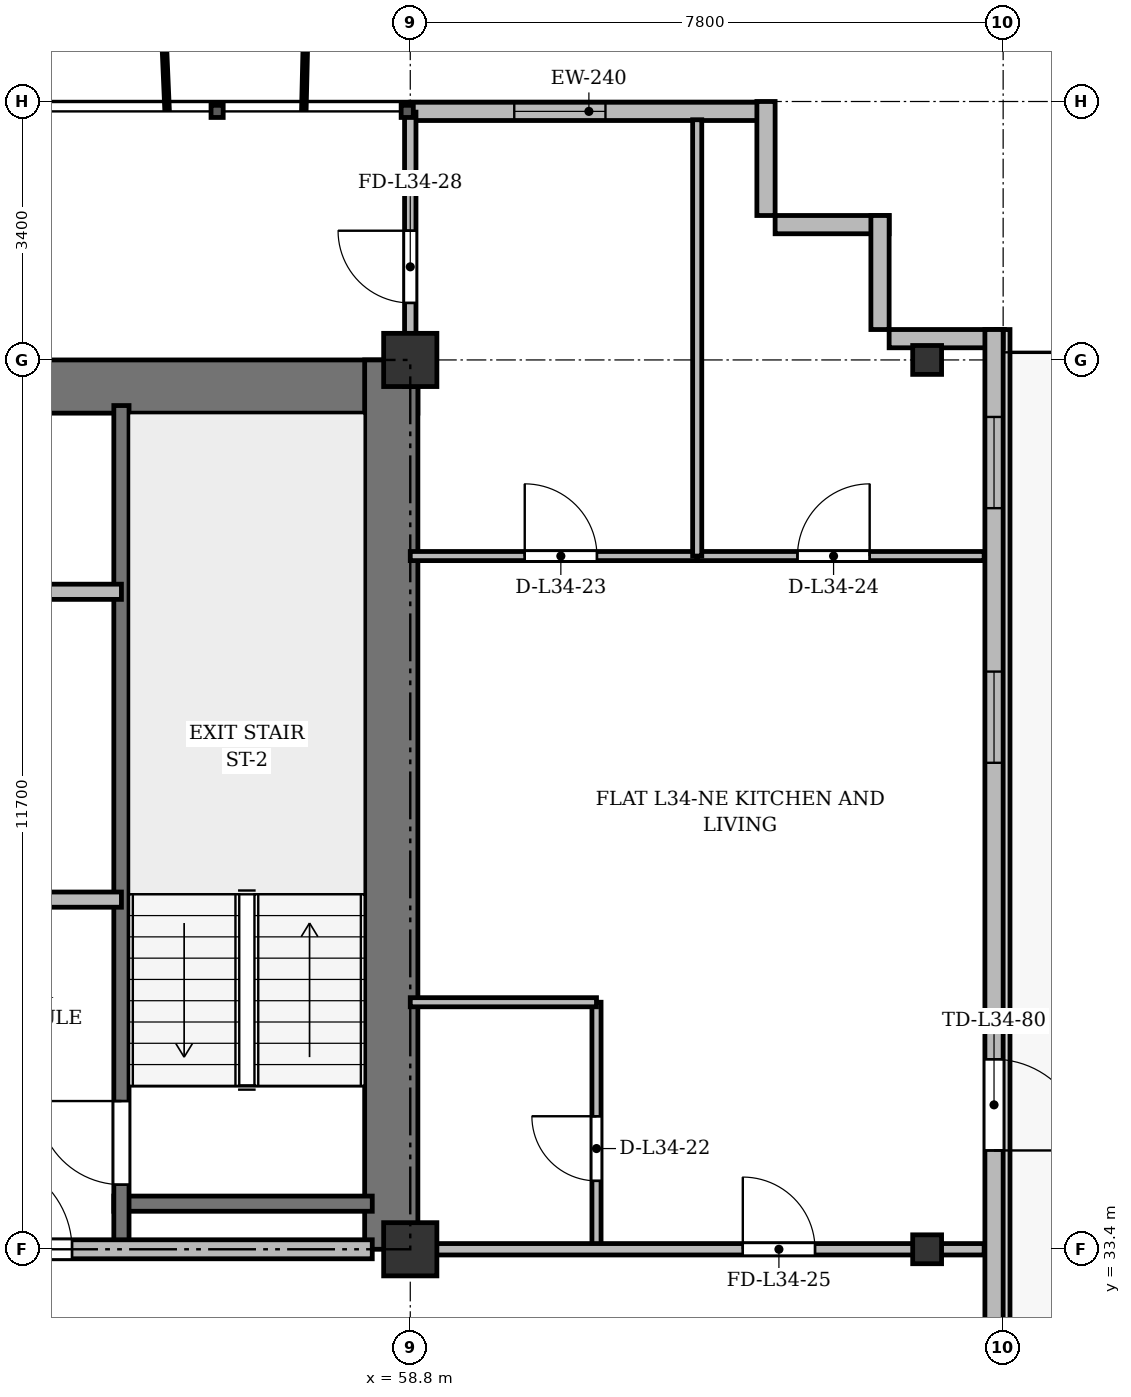
"""IFC4 building model, lengths in metres.
Left out: names, types, materials, properties, quantities, classifications, styles, units other than length and angle.
Written with IfcOpenShell. Run it as: python <this file> out.ifc"""

import sys

from ifc_helpers import new_model, si_unit, direction, frame, frame_2d, origin, origin_2d, place, context, subcontext, project, spatial, rectangle, i_section, extrude, source, transform, mapped, element, fill, save


model = new_model("IFC4")
c1 = context("Model", 3, precision=1e-05, world=origin(), true_north=direction((0.0, 1.0)))
c2 = subcontext(c1, "Body", "Model", "MODEL_VIEW")
j1 = project(units=[si_unit("LENGTHUNIT", "METRE"), si_unit("PLANEANGLEUNIT", "RADIAN")], contexts=[c1])
p1 = place(None, origin())
s1 = spatial("IfcSite", under=j1, at=p1, CompositionType="ELEMENT")
p2 = place(p1, origin())
s2 = spatial("IfcBuilding", under=s1, at=p2, CompositionType="ELEMENT")
p3 = place(p2, frame((0.0, 0.0, 132.1)))
s3 = spatial("IfcBuildingStorey", under=s2, at=p3, CompositionType="ELEMENT", Elevation=132.1)
m1 = source(origin(), c2, "Body", "SweptSolid", [
    extrude(rectangle(XDim=0.7, YDim=0.7, at=origin_2d()), origin(), (0.0, 0.0, 1.0), 3.6),
])
for number, where, z_axis, x_axis in (
    (1, (58.8, 33.4, 0.0), (0.0, 0.0, 1.0), (1.0, 0.0, 0.0)),
    (2, (58.8, 45.1, 0.0), (0.0, 0.0, 1.0), (1.0, 0.0, 0.0)),
):
    element("IfcColumn", number, at=place(p3, frame(where, z_axis=z_axis, x_axis=x_axis)), inside=s3, PredefinedType="COLUMN", context=c2, shape_type="MappedRepresentation", body=[
        mapped(m1, transform((0.0, 0.0, 0.0), x_axis=(1.0, 0.0, 0.0), y_axis=(0.0, 1.0, 0.0), z_axis=(0.0, 0.0, 1.0), scale=1.0)),
    ])
m2 = source(origin(), c2, "Body", "SweptSolid", [
    extrude(i_section(OverallWidth=0.38, OverallDepth=0.38, WebThickness=0.02, FlangeThickness=0.03, at=origin_2d()), origin(), (0.0, 0.0, 1.0), 3.6),
])
for number, where, z_axis, x_axis in (
    (3, (65.6, 33.4, 0.0), (0.0, 0.0, 1.0), (1.0, 0.0, 0.0)),
    (4, (65.6, 45.1, 0.0), (0.0, 0.0, 1.0), (1.0, 0.0, 0.0)),
):
    element("IfcColumn", number, at=place(p3, frame(where, z_axis=z_axis, x_axis=x_axis)), inside=s3, PredefinedType="COLUMN", context=c2, shape_type="MappedRepresentation", body=[
        mapped(m2, transform((0.0, 0.0, 0.0), x_axis=(1.0, 0.0, 0.0), y_axis=(0.0, 1.0, 0.0), z_axis=(0.0, 0.0, 1.0), scale=1.0)),
    ])
p4 = place(p3, frame((58.8, 48.37, 0.0), z_axis=(0.0, 0.0, 1.0), x_axis=(1.0, 0.0, 0.0)))
e5 = element("IfcWall", 5, at=p4, inside=s3, PredefinedType="SOLIDWALL", context=c2, shape_type="SweptSolid", body=[
    extrude(rectangle(XDim=4.7, YDim=0.24, at=frame_2d((2.35, 0.0))), origin(), (0.0, 0.0, 1.0), 3.35),
])
p5 = place(p4, frame((1.368, 0.0, 0.9)))
e6 = element("IfcOpeningElement", 6, at=p5, cuts=e5, PredefinedType="OPENING", context=c2, shape_type="SweptSolid", body=[
    extrude(rectangle(XDim=1.2, YDim=1.65, at=frame_2d((0.6, 0.825))), frame((0.0, 0.13, 0.0), z_axis=(0.0, -1.0, 0.0), x_axis=(1.0, 0.0, 0.0)), (0.0, 0.0, 1.0), 0.26),
])
for number, where, z_axis, x_axis in (
    (7, (63.48, 48.5, 0.0), (0.0, 0.0, 1.0), (0.0, -1.0, 0.0)),
    (8, (63.6, 46.88, 0.0), (0.0, 0.0, 1.0), (1.0, 0.0, 0.0)),
    (9, (64.98, 47.0, 0.0), (0.0, 0.0, 1.0), (0.0, -1.0, 0.0)),
    (10, (65.1, 45.38, 0.0), (0.0, 0.0, 1.0), (1.0, 0.0, 0.0)),
):
    element("IfcWall", number, at=place(p3, frame(where, z_axis=z_axis, x_axis=x_axis)), inside=s3, PredefinedType="SOLIDWALL", context=c2, shape_type="SweptSolid", body=[
        extrude(rectangle(XDim=1.5, YDim=0.24, at=frame_2d((0.75, 0.0))), origin(), (0.0, 0.0, 1.0), 3.35),
    ])
p6 = place(p3, frame((66.48, 45.5, 0.0), z_axis=(0.0, 0.0, 1.0), x_axis=(0.0, -1.0, 0.0)))
e11 = element("IfcWall", 11, at=p6, inside=s3, PredefinedType="SOLIDWALL", context=c2, shape_type="SweptSolid", body=[
    extrude(rectangle(XDim=39.2, YDim=0.24, at=frame_2d((19.6, 0.0))), origin(), (0.0, 0.0, 1.0), 3.35),
])
p7 = place(p6, frame((9.6, 0.0, 0.0)))
e12 = element("IfcOpeningElement", 12, at=p7, cuts=e11, PredefinedType="OPENING", context=c2, shape_type="SweptSolid", body=[
    extrude(rectangle(XDim=1.2, YDim=2.2, at=frame_2d((0.6, 1.1))), frame((0.0, 0.13, 0.0), z_axis=(0.0, -1.0, 0.0), x_axis=(1.0, 0.0, 0.0)), (0.0, 0.0, 1.0), 0.26),
])
p8 = place(p6, frame((36.55, 0.0, 0.92)))
e13 = element("IfcOpeningElement", 13, at=p8, cuts=e11, PredefinedType="OPENING", context=c2, shape_type="SweptSolid", body=[
    extrude(rectangle(XDim=1.2, YDim=1.65, at=frame_2d((0.6, 0.825))), frame((0.0, 0.13, 0.0), z_axis=(0.0, -1.0, 0.0), x_axis=(1.0, 0.0, 0.0)), (0.0, 0.0, 1.0), 0.26),
])
p9 = place(p6, frame((32.8, 0.0, 0.92)))
e14 = element("IfcOpeningElement", 14, at=p9, cuts=e11, PredefinedType="OPENING", context=c2, shape_type="SweptSolid", body=[
    extrude(rectangle(XDim=2.6, YDim=1.9, at=frame_2d((1.3, 0.95))), frame((0.0, 0.13, 0.0), z_axis=(0.0, -1.0, 0.0), x_axis=(1.0, 0.0, 0.0)), (0.0, 0.0, 1.0), 0.26),
])
p10 = place(p6, frame((28.6, 0.0, 0.92)))
e15 = element("IfcOpeningElement", 15, at=p10, cuts=e11, PredefinedType="OPENING", context=c2, shape_type="SweptSolid", body=[
    extrude(rectangle(XDim=2.6, YDim=1.9, at=frame_2d((1.3, 0.95))), frame((0.0, 0.13, 0.0), z_axis=(0.0, -1.0, 0.0), x_axis=(1.0, 0.0, 0.0)), (0.0, 0.0, 1.0), 0.26),
])
p11 = place(p6, frame((21.4, 0.0, 0.92)))
e16 = element("IfcOpeningElement", 16, at=p11, cuts=e11, PredefinedType="OPENING", context=c2, shape_type="SweptSolid", body=[
    extrude(rectangle(XDim=2.6, YDim=1.9, at=frame_2d((1.3, 0.95))), frame((0.0, 0.13, 0.0), z_axis=(0.0, -1.0, 0.0), x_axis=(1.0, 0.0, 0.0)), (0.0, 0.0, 1.0), 0.26),
])
p12 = place(p6, frame((4.5, 0.0, 0.92)))
e17 = element("IfcOpeningElement", 17, at=p12, cuts=e11, PredefinedType="OPENING", context=c2, shape_type="SweptSolid", body=[
    extrude(rectangle(XDim=1.2, YDim=1.65, at=frame_2d((0.6, 0.825))), frame((0.0, 0.13, 0.0), z_axis=(0.0, -1.0, 0.0), x_axis=(1.0, 0.0, 0.0)), (0.0, 0.0, 1.0), 0.26),
])
p13 = place(p6, frame((1.15, 0.0, 0.92)))
e18 = element("IfcOpeningElement", 18, at=p13, cuts=e11, PredefinedType="OPENING", context=c2, shape_type="SweptSolid", body=[
    extrude(rectangle(XDim=1.2, YDim=1.65, at=frame_2d((0.6, 0.825))), frame((0.0, 0.13, 0.0), z_axis=(0.0, -1.0, 0.0), x_axis=(1.0, 0.0, 0.0)), (0.0, 0.0, 1.0), 0.26),
])
p14 = place(p3, frame((15.5, 44.75, 0.0), z_axis=(0.0, 0.0, 1.0), x_axis=(1.0, 0.0, 0.0)))
e19 = element("IfcWall", 19, at=p14, inside=s3, PredefinedType="SHEAR", context=c2, shape_type="SweptSolid", body=[
    extrude(rectangle(XDim=43.4, YDim=0.7, at=frame_2d((21.7, 0.0))), origin(), (0.0, 0.0, 1.0), 3.35),
])
p15 = place(p3, frame((58.55, 33.4, 0.0), z_axis=(0.0, 0.0, 1.0), x_axis=(0.0, 1.0, 0.0)))
e20 = element("IfcWall", 20, at=p15, inside=s3, PredefinedType="SHEAR", context=c2, shape_type="SweptSolid", body=[
    extrude(rectangle(XDim=11.7, YDim=0.7, at=frame_2d((5.85, 0.0))), origin(), (0.0, 0.0, 1.0), 3.35),
])
p16 = place(p3, frame((54.9, 34.0, 0.0), z_axis=(0.0, 0.0, 1.0), x_axis=(1.0, 0.0, 0.0)))
e21 = element("IfcWall", 21, at=p16, inside=s3, PredefinedType="SHEAR", context=c2, shape_type="SweptSolid", body=[
    extrude(rectangle(XDim=3.4, YDim=0.2, at=frame_2d((1.7, 0.0))), origin(), (0.0, 0.0, 1.0), 3.35),
])
p17 = place(p3, frame((55.0, 33.4, 0.0), z_axis=(0.0, 0.0, 1.0), x_axis=(0.0, 1.0, 0.0)))
e22 = element("IfcWall", 22, at=p17, inside=s3, PredefinedType="SHEAR", context=c2, shape_type="SweptSolid", body=[
    extrude(rectangle(XDim=11.1, YDim=0.2, at=frame_2d((5.55, 0.0))), origin(), (0.0, 0.0, 1.0), 3.35),
])
p18 = place(p17, frame((0.85, 0.0, 0.0)))
e23 = element("IfcOpeningElement", 23, at=p18, cuts=e22, PredefinedType="OPENING", context=c2, shape_type="SweptSolid", body=[
    extrude(rectangle(XDim=1.1, YDim=2.15, at=frame_2d((0.55, 1.075))), frame((0.0, 0.11, 0.0), z_axis=(0.0, -1.0, 0.0), x_axis=(1.0, 0.0, 0.0)), (0.0, 0.0, 1.0), 0.22),
])
p19 = place(p3, frame((47.15, 42.05, 0.0), z_axis=(0.0, 0.0, 1.0), x_axis=(1.0, 0.0, 0.0)))
e24 = element("IfcWall", 24, at=p19, inside=s3, PredefinedType="SOLIDWALL", context=c2, shape_type="SweptSolid", body=[
    extrude(rectangle(XDim=7.85, YDim=0.2, at=frame_2d((3.925, 0.0))), origin(), (0.0, 0.0, 1.0), 2.85),
])
p20 = place(p19, frame((0.75, 0.0, 0.0)))
e25 = element("IfcOpeningElement", 25, at=p20, cuts=e24, PredefinedType="OPENING", context=c2, shape_type="SweptSolid", body=[
    extrude(rectangle(XDim=0.9, YDim=2.1, at=frame_2d((0.45, 1.05))), frame((0.0, 0.11, 0.0), z_axis=(0.0, -1.0, 0.0), x_axis=(1.0, 0.0, 0.0)), (0.0, 0.0, 1.0), 0.22),
])
p21 = place(p19, frame((3.85, 0.0, 0.0)))
e26 = element("IfcOpeningElement", 26, at=p21, cuts=e24, PredefinedType="OPENING", context=c2, shape_type="SweptSolid", body=[
    extrude(rectangle(XDim=0.9, YDim=2.1, at=frame_2d((0.45, 1.05))), frame((0.0, 0.11, 0.0), z_axis=(0.0, -1.0, 0.0), x_axis=(1.0, 0.0, 0.0)), (0.0, 0.0, 1.0), 0.22),
])
p22 = place(p3, frame((52.45, 38.0, 0.0), z_axis=(0.0, 0.0, 1.0), x_axis=(1.0, 0.0, 0.0)))
e27 = element("IfcWall", 27, at=p22, inside=s3, PredefinedType="PARTITIONING", context=c2, shape_type="SweptSolid", body=[
    extrude(rectangle(XDim=2.55, YDim=0.2, at=frame_2d((1.275, 0.0))), origin(), (0.0, 0.0, 1.0), 3.35),
])
p23 = place(p3, frame((47.15, 33.4, 0.0), z_axis=(0.0, 0.0, 1.0), x_axis=(1.0, 0.0, 0.0)))
e28 = element("IfcWall", 28, at=p23, inside=s3, PredefinedType="PARTITIONING", context=c2, shape_type="SweptSolid", body=[
    extrude(rectangle(XDim=11.15, YDim=0.25, at=frame_2d((5.575, 0.0))), origin(), (0.0, 0.0, 1.0), 2.75),
])
p24 = place(p23, frame((0.7, 0.0, 0.0)))
e29 = element("IfcOpeningElement", 29, at=p24, cuts=e28, PredefinedType="OPENING", context=c2, shape_type="SweptSolid", body=[
    extrude(rectangle(XDim=0.95, YDim=2.15, at=frame_2d((0.475, 1.075))), frame((0.0, 0.135, 0.0), z_axis=(0.0, -1.0, 0.0), x_axis=(1.0, 0.0, 0.0)), (0.0, 0.0, 1.0), 0.27),
])
p25 = place(p23, frame((6.0, 0.0, 0.0)))
e30 = element("IfcOpeningElement", 30, at=p25, cuts=e28, PredefinedType="OPENING", context=c2, shape_type="SweptSolid", body=[
    extrude(rectangle(XDim=1.2, YDim=2.15, at=frame_2d((0.6, 1.075))), frame((0.0, 0.135, 0.0), z_axis=(0.0, -1.0, 0.0), x_axis=(1.0, 0.0, 0.0)), (0.0, 0.0, 1.0), 0.27),
])
p26 = place(p3, frame((61.25, 33.4, 0.0), z_axis=(0.0, 0.0, 1.0), x_axis=(0.0, 1.0, 0.0)))
e31 = element("IfcWall", 31, at=p26, inside=s3, PredefinedType="PARTITIONING", context=c2, shape_type="SweptSolid", body=[
    extrude(rectangle(XDim=3.25, YDim=0.12, at=frame_2d((1.625, 0.0))), origin(), (0.0, 0.0, 1.0), 2.75),
])
p27 = place(p26, frame((0.9, 0.0, 0.0)))
e32 = element("IfcOpeningElement", 32, at=p27, cuts=e31, PredefinedType="OPENING", context=c2, shape_type="SweptSolid", body=[
    extrude(rectangle(XDim=0.85, YDim=2.1, at=frame_2d((0.425, 1.05))), frame((0.0, 0.07, 0.0), z_axis=(0.0, -1.0, 0.0), x_axis=(1.0, 0.0, 0.0)), (0.0, 0.0, 1.0), 0.14),
])
p28 = place(p3, frame((58.8, 36.65, 0.0), z_axis=(0.0, 0.0, 1.0), x_axis=(1.0, 0.0, 0.0)))
e33 = element("IfcWall", 33, at=p28, inside=s3, PredefinedType="PARTITIONING", context=c2, shape_type="SweptSolid", body=[
    extrude(rectangle(XDim=2.45, YDim=0.12, at=frame_2d((1.225, 0.0))), origin(), (0.0, 0.0, 1.0), 2.85),
])
p29 = place(p3, frame((58.8, 42.52, 0.0), z_axis=(0.0, 0.0, 1.0), x_axis=(1.0, 0.0, 0.0)))
e34 = element("IfcWall", 34, at=p29, inside=s3, PredefinedType="PARTITIONING", context=c2, shape_type="SweptSolid", body=[
    extrude(rectangle(XDim=3.775, YDim=0.12, at=frame_2d((1.887, 0.0))), origin(), (0.0, 0.0, 1.0), 2.85),
])
p30 = place(p29, frame((1.506, 0.0, 0.0)))
e35 = element("IfcOpeningElement", 35, at=p30, cuts=e34, PredefinedType="OPENING", context=c2, shape_type="SweptSolid", body=[
    extrude(rectangle(XDim=0.95, YDim=2.15, at=frame_2d((0.475, 1.075))), frame((0.0, 0.07, 0.0), z_axis=(0.0, -1.0, 0.0), x_axis=(1.0, 0.0, 0.0)), (0.0, 0.0, 1.0), 0.14),
])
p31 = place(p3, frame((62.575, 42.52, 0.0), z_axis=(0.0, 0.0, 1.0), x_axis=(1.0, 0.0, 0.0)))
e36 = element("IfcWall", 36, at=p31, inside=s3, PredefinedType="PARTITIONING", context=c2, shape_type="SweptSolid", body=[
    extrude(rectangle(XDim=3.775, YDim=0.12, at=frame_2d((1.888, 0.0))), origin(), (0.0, 0.0, 1.0), 2.85),
])
p32 = place(p31, frame((1.319, 0.0, 0.0)))
e37 = element("IfcOpeningElement", 37, at=p32, cuts=e36, PredefinedType="OPENING", context=c2, shape_type="SweptSolid", body=[
    extrude(rectangle(XDim=0.95, YDim=2.15, at=frame_2d((0.475, 1.075))), frame((0.0, 0.07, 0.0), z_axis=(0.0, -1.0, 0.0), x_axis=(1.0, 0.0, 0.0)), (0.0, 0.0, 1.0), 0.14),
])
p33 = place(p3, frame((62.575, 42.52, 0.0), z_axis=(0.0, 0.0, 1.0), x_axis=(0.0, 1.0, 0.0)))
e38 = element("IfcWall", 38, at=p33, inside=s3, PredefinedType="PARTITIONING", context=c2, shape_type="SweptSolid", body=[
    extrude(rectangle(XDim=5.74, YDim=0.12, at=frame_2d((2.87, 0.0))), origin(), (0.0, 0.0, 1.0), 2.75),
])
p34 = place(p3, frame((58.8, 33.4, 0.0), z_axis=(0.0, 0.0, 1.0), x_axis=(1.0, 0.0, 0.0)))
e39 = element("IfcWall", 39, at=p34, inside=s3, PredefinedType="PARTITIONING", context=c2, shape_type="SweptSolid", body=[
    extrude(rectangle(XDim=7.55, YDim=0.15, at=frame_2d((3.775, 0.0))), origin(), (0.0, 0.0, 1.0), 2.75),
])
p35 = place(p34, frame((4.375, 0.0, 0.0)))
e40 = element("IfcOpeningElement", 40, at=p35, cuts=e39, PredefinedType="OPENING", context=c2, shape_type="SweptSolid", body=[
    extrude(rectangle(XDim=0.95, YDim=2.15, at=frame_2d((0.475, 1.075))), frame((0.0, 0.085, 0.0), z_axis=(0.0, -1.0, 0.0), x_axis=(1.0, 0.0, 0.0)), (0.0, 0.0, 1.0), 0.17),
])
p36 = place(p3, frame((58.8, 44.75, 0.0), z_axis=(0.0, 0.0, 1.0), x_axis=(0.0, 1.0, 0.0)))
e41 = element("IfcWall", 41, at=p36, inside=s3, PredefinedType="PARTITIONING", context=c2, shape_type="SweptSolid", body=[
    extrude(rectangle(XDim=3.61, YDim=0.15, at=frame_2d((1.805, 0.0))), origin(), (0.0, 0.0, 1.0), 2.85),
])
p37 = place(p36, frame((1.1, 0.0, 0.0)))
e42 = element("IfcOpeningElement", 42, at=p37, cuts=e41, PredefinedType="OPENING", context=c2, shape_type="SweptSolid", body=[
    extrude(rectangle(XDim=0.95, YDim=2.15, at=frame_2d((0.475, 1.075))), frame((0.0, 0.085, 0.0), z_axis=(0.0, -1.0, 0.0), x_axis=(1.0, 0.0, 0.0)), (0.0, 0.0, 1.0), 0.17),
])
m3 = source(origin(), c2, "Body", "SweptSolid", [
    extrude(rectangle(XDim=1.2, YDim=1.65, at=frame_2d((0.6, 0.825))), frame((0.0, 0.03, 0.0), z_axis=(0.0, -1.0, 0.0), x_axis=(1.0, 0.0, 0.0)), (0.0, 0.0, 1.0), 0.06),
])
p38 = place(p5, origin())
e43 = element("IfcWindow", 43, at=p38, inside=s3, PartitioningType="SINGLE_PANEL", PredefinedType="WINDOW", context=c2, shape_type="MappedRepresentation", body=[
    mapped(m3, transform((0.0, 0.0, 0.0), x_axis=(1.0, 0.0, 0.0), y_axis=(0.0, 1.0, 0.0), z_axis=(0.0, 0.0, 1.0), scale=1.0)),
])
fill(e6, e43)
m4 = source(origin(), c2, "Body", "SweptSolid", [
    extrude(rectangle(XDim=1.2, YDim=2.2, at=frame_2d((0.6, 1.1))), frame((0.0, 0.025, 0.0), z_axis=(0.0, -1.0, 0.0), x_axis=(1.0, 0.0, 0.0)), (0.0, 0.0, 1.0), 0.05),
])
p39 = place(p7, origin())
e44 = element("IfcDoor", 44, at=p39, inside=s3, OperationType="SINGLE_SWING_RIGHT", PredefinedType="DOOR", context=c2, shape_type="MappedRepresentation", body=[
    mapped(m4, transform((0.0, 0.0, 0.0), x_axis=(1.0, 0.0, 0.0), y_axis=(0.0, 1.0, 0.0), z_axis=(0.0, 0.0, 1.0), scale=1.0)),
])
fill(e12, e44)
p40 = place(p12, origin())
e45 = element("IfcWindow", 45, at=p40, inside=s3, PartitioningType="SINGLE_PANEL", PredefinedType="WINDOW", context=c2, shape_type="MappedRepresentation", body=[
    mapped(m3, transform((0.0, 0.0, 0.0), x_axis=(1.0, 0.0, 0.0), y_axis=(0.0, 1.0, 0.0), z_axis=(0.0, 0.0, 1.0), scale=1.0)),
])
fill(e17, e45)
p41 = place(p13, origin())
e46 = element("IfcWindow", 46, at=p41, inside=s3, PartitioningType="SINGLE_PANEL", PredefinedType="WINDOW", context=c2, shape_type="MappedRepresentation", body=[
    mapped(m3, transform((0.0, 0.0, 0.0), x_axis=(1.0, 0.0, 0.0), y_axis=(0.0, 1.0, 0.0), z_axis=(0.0, 0.0, 1.0), scale=1.0)),
])
fill(e18, e46)
m5 = source(origin(), c2, "Body", "SweptSolid", [
    extrude(rectangle(XDim=1.1, YDim=2.15, at=frame_2d((0.55, 1.075))), frame((0.0, 0.025, 0.0), z_axis=(0.0, -1.0, 0.0), x_axis=(1.0, 0.0, 0.0)), (0.0, 0.0, 1.0), 0.05),
])
p42 = place(p18, origin())
e47 = element("IfcDoor", 47, at=p42, inside=s3, OperationType="SINGLE_SWING_RIGHT", PredefinedType="DOOR", context=c2, shape_type="MappedRepresentation", body=[
    mapped(m5, transform((0.0, 0.0, 0.0), x_axis=(1.0, 0.0, 0.0), y_axis=(0.0, 1.0, 0.0), z_axis=(0.0, 0.0, 1.0), scale=1.0)),
])
fill(e23, e47)
m6 = source(origin(), c2, "Body", "SweptSolid", [
    extrude(rectangle(XDim=1.2, YDim=2.15, at=frame_2d((0.6, 1.075))), frame((0.0, 0.025, 0.0), z_axis=(0.0, -1.0, 0.0), x_axis=(1.0, 0.0, 0.0)), (0.0, 0.0, 1.0), 0.05),
])
p43 = place(p25, origin())
e48 = element("IfcDoor", 48, at=p43, inside=s3, OperationType="SINGLE_SWING_LEFT", PredefinedType="DOOR", context=c2, shape_type="MappedRepresentation", body=[
    mapped(m6, transform((0.0, 0.0, 0.0), x_axis=(1.0, 0.0, 0.0), y_axis=(0.0, 1.0, 0.0), z_axis=(0.0, 0.0, 1.0), scale=1.0)),
])
fill(e30, e48)
m7 = source(origin(), c2, "Body", "SweptSolid", [
    extrude(rectangle(XDim=0.85, YDim=2.1, at=frame_2d((0.425, 1.05))), frame((0.0, 0.025, 0.0), z_axis=(0.0, -1.0, 0.0), x_axis=(1.0, 0.0, 0.0)), (0.0, 0.0, 1.0), 0.05),
])
p44 = place(p27, origin())
e49 = element("IfcDoor", 49, at=p44, inside=s3, OperationType="SINGLE_SWING_RIGHT", PredefinedType="DOOR", context=c2, shape_type="MappedRepresentation", body=[
    mapped(m7, transform((0.0, 0.0, 0.0), x_axis=(1.0, 0.0, 0.0), y_axis=(0.0, 1.0, 0.0), z_axis=(0.0, 0.0, 1.0), scale=1.0)),
])
fill(e32, e49)
m8 = source(origin(), c2, "Body", "SweptSolid", [
    extrude(rectangle(XDim=0.95, YDim=2.15, at=frame_2d((0.475, 1.075))), frame((0.0, 0.025, 0.0), z_axis=(0.0, -1.0, 0.0), x_axis=(1.0, 0.0, 0.0)), (0.0, 0.0, 1.0), 0.05),
])
p45 = place(p30, origin())
e50 = element("IfcDoor", 50, at=p45, inside=s3, OperationType="SINGLE_SWING_LEFT", PredefinedType="DOOR", context=c2, shape_type="MappedRepresentation", body=[
    mapped(m8, transform((0.0, 0.0, 0.0), x_axis=(1.0, 0.0, 0.0), y_axis=(0.0, 1.0, 0.0), z_axis=(0.0, 0.0, 1.0), scale=1.0)),
])
fill(e35, e50)
p46 = place(p32, origin())
e51 = element("IfcDoor", 51, at=p46, inside=s3, OperationType="SINGLE_SWING_RIGHT", PredefinedType="DOOR", context=c2, shape_type="MappedRepresentation", body=[
    mapped(m8, transform((0.0, 0.0, 0.0), x_axis=(1.0, 0.0, 0.0), y_axis=(0.0, 1.0, 0.0), z_axis=(0.0, 0.0, 1.0), scale=1.0)),
])
fill(e37, e51)
p47 = place(p35, origin())
e52 = element("IfcDoor", 52, at=p47, inside=s3, OperationType="SINGLE_SWING_LEFT", PredefinedType="DOOR", context=c2, shape_type="MappedRepresentation", body=[
    mapped(m8, transform((0.0, 0.0, 0.0), x_axis=(1.0, 0.0, 0.0), y_axis=(0.0, 1.0, 0.0), z_axis=(0.0, 0.0, 1.0), scale=1.0)),
])
fill(e40, e52)
p48 = place(p37, origin())
e53 = element("IfcDoor", 53, at=p48, inside=s3, OperationType="SINGLE_SWING_RIGHT", PredefinedType="DOOR", context=c2, shape_type="MappedRepresentation", body=[
    mapped(m8, transform((0.0, 0.0, 0.0), x_axis=(1.0, 0.0, 0.0), y_axis=(0.0, 1.0, 0.0), z_axis=(0.0, 0.0, 1.0), scale=1.0)),
])
fill(e42, e53)
save(model, sys.argv[1])
